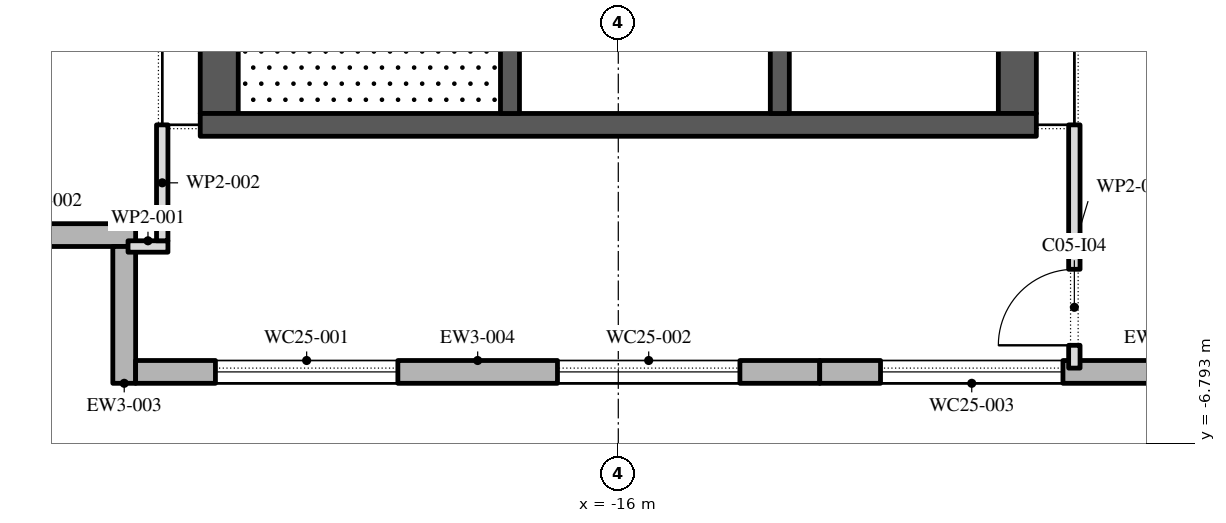
"""IFC4 building model, lengths in metres.
Left out: names, types, materials, properties, quantities, classifications, styles, units other than length and angle.
Written with IfcOpenShell. Run it as: python <this file> out.ifc"""

import sys

from ifc_helpers import new_model, si_unit, direction, frame, frame_2d, origin, place, context, subcontext, project, spatial, polyline, rectangle, outline, extrude, element, fill, save


model = new_model("IFC4")
c1 = context("Model", 3, precision=1e-05, world=origin(), true_north=direction((0.0, 1.0)))
c2 = subcontext(c1, "Body", "Model", "MODEL_VIEW")
j1 = project(units=[si_unit("LENGTHUNIT", "METRE"), si_unit("PLANEANGLEUNIT", "RADIAN")], contexts=[c1])
p1 = place(None, origin())
s1 = spatial("IfcSite", under=j1, at=p1, CompositionType="ELEMENT")
p2 = place(p1, origin())
s2 = spatial("IfcBuilding", under=s1, at=p2, CompositionType="ELEMENT")
p3 = place(p2, frame((0.0, 0.0, 385.8)))
s3 = spatial("IfcBuildingStorey", under=s2, at=p3, CompositionType="ELEMENT", Elevation=385.8)
p4 = place(p3, frame((-24.75, -4.05, 0.0), z_axis=(0.0, 0.0, 1.0), x_axis=(1.0, 0.0, 0.0)))
e1 = element("IfcWall", 1, at=p4, inside=s3, PredefinedType="STANDARD", context=c2, shape_type="SweptSolid", body=[
    extrude(rectangle(XDim=2.4, YDim=0.3, at=frame_2d((1.2, 0.0))), origin(), (0.0, 0.0, 1.0), 4.0),
])
p5 = place(p3, frame((-22.5, -4.2, 0.0), z_axis=(0.0, 0.0, 1.0), x_axis=(0.0, -1.0, 0.0)))
e2 = element("IfcWall", 2, at=p5, inside=s3, PredefinedType="STANDARD", context=c2, shape_type="SweptSolid", body=[
    extrude(rectangle(XDim=1.8, YDim=0.3, at=frame_2d((0.9, 0.0))), origin(), (0.0, 0.0, 1.0), 4.0),
])
p6 = place(p3, frame((-22.35, -5.85, 0.0), z_axis=(0.0, 0.0, 1.0), x_axis=(1.0, 0.0, 0.0)))
e3 = element("IfcWall", 3, at=p6, inside=s3, PredefinedType="STANDARD", context=c2, shape_type="SweptSolid", body=[
    extrude(rectangle(XDim=9.0, YDim=0.3, at=frame_2d((4.5, 0.0))), origin(), (0.0, 0.0, 1.0), 4.0),
])
p7 = place(p6, frame((1.05, 0.0, 0.8)))
e4 = element("IfcOpeningElement", 4, at=p7, cuts=e3, PredefinedType="OPENING", context=c2, shape_type="SweptSolid", body=[
    extrude(outline(polyline([(0.0, 0.0), (2.4, 0.0), (2.4, 1.25), (2.377, 1.488), (2.31, 1.717), (2.2, 1.929), (2.051, 2.116), (1.87, 2.272), (1.663, 2.391), (1.437, 2.468), (1.2, 2.5), (0.963, 2.468), (0.737, 2.391), (0.53, 2.272), (0.349, 2.116), (0.2, 1.929), (0.09, 1.717), (0.023, 1.488), (0.0, 1.25), (0.0, 0.0)])), frame((0.0, 0.16, 0.0), z_axis=(0.0, -1.0, 0.0), x_axis=(1.0, 0.0, 0.0)), (0.0, 0.0, 1.0), 0.32),
])
p8 = place(p6, frame((5.55, 0.0, 0.8)))
e5 = element("IfcOpeningElement", 5, at=p8, cuts=e3, PredefinedType="OPENING", context=c2, shape_type="SweptSolid", body=[
    extrude(outline(polyline([(0.0, 0.0), (2.4, 0.0), (2.4, 1.25), (2.377, 1.488), (2.31, 1.717), (2.2, 1.929), (2.051, 2.116), (1.87, 2.272), (1.663, 2.391), (1.437, 2.468), (1.2, 2.5), (0.963, 2.468), (0.737, 2.391), (0.53, 2.272), (0.349, 2.116), (0.2, 1.929), (0.09, 1.717), (0.023, 1.488), (0.0, 1.25), (0.0, 0.0)])), frame((0.0, 0.16, 0.0), z_axis=(0.0, -1.0, 0.0), x_axis=(1.0, 0.0, 0.0)), (0.0, 0.0, 1.0), 0.32),
])
p9 = place(p3, frame((-13.35, -5.85, 0.0), z_axis=(0.0, 0.0, 1.0), x_axis=(1.0, 0.0, 0.0)))
e6 = element("IfcWall", 6, at=p9, inside=s3, PredefinedType="STANDARD", context=c2, shape_type="SweptSolid", body=[
    extrude(rectangle(XDim=9.0, YDim=0.3, at=frame_2d((4.5, 0.0))), origin(), (0.0, 0.0, 1.0), 4.0),
])
p10 = place(p9, frame((0.8, 0.0, 0.8)))
e7 = element("IfcOpeningElement", 7, at=p10, cuts=e6, PredefinedType="OPENING", context=c2, shape_type="SweptSolid", body=[
    extrude(outline(polyline([(0.0, 0.0), (2.4, 0.0), (2.4, 1.25), (2.377, 1.488), (2.31, 1.717), (2.2, 1.929), (2.051, 2.116), (1.87, 2.272), (1.663, 2.391), (1.437, 2.468), (1.2, 2.5), (0.963, 2.468), (0.737, 2.391), (0.53, 2.272), (0.349, 2.116), (0.2, 1.929), (0.09, 1.717), (0.023, 1.488), (0.0, 1.25), (0.0, 0.0)])), frame((0.0, 0.16, 0.0), z_axis=(0.0, -1.0, 0.0), x_axis=(1.0, 0.0, 0.0)), (0.0, 0.0, 1.0), 0.32),
])
p11 = place(p9, frame((5.55, 0.0, 0.8)))
e8 = element("IfcOpeningElement", 8, at=p11, cuts=e6, PredefinedType="OPENING", context=c2, shape_type="SweptSolid", body=[
    extrude(outline(polyline([(0.0, 0.0), (2.4, 0.0), (2.4, 1.25), (2.377, 1.488), (2.31, 1.717), (2.2, 1.929), (2.051, 2.116), (1.87, 2.272), (1.663, 2.391), (1.437, 2.468), (1.2, 2.5), (0.963, 2.468), (0.737, 2.391), (0.53, 2.272), (0.349, 2.116), (0.2, 1.929), (0.09, 1.717), (0.023, 1.488), (0.0, 1.25), (0.0, 0.0)])), frame((0.0, 0.16, 0.0), z_axis=(0.0, -1.0, 0.0), x_axis=(1.0, 0.0, 0.0)), (0.0, 0.0, 1.0), 0.32),
])
p12 = place(p3, frame((-21.25, -2.45, 0.0), z_axis=(0.0, 0.0, 1.0), x_axis=(0.0, 1.0, 0.0)))
e9 = element("IfcWall", 9, at=p12, inside=s3, PredefinedType="SHEAR", context=c2, shape_type="SweptSolid", body=[
    extrude(rectangle(XDim=27.9, YDim=0.5, at=frame_2d((13.95, 0.0))), origin(), (0.0, 0.0, 1.0), 4.0),
])
p13 = place(p12, frame((5.05, 0.0, 0.0)))
e10 = element("IfcOpeningElement", 10, at=p13, cuts=e9, PredefinedType="OPENING", context=c2, shape_type="SweptSolid", body=[
    extrude(rectangle(XDim=1.2, YDim=2.1, at=frame_2d((0.6, 1.05))), frame((0.0, 0.26, 0.0), z_axis=(0.0, -1.0, 0.0), x_axis=(1.0, 0.0, 0.0)), (0.0, 0.0, 1.0), 0.52),
])
p14 = place(p12, frame((21.65, 0.0, 0.0)))
e11 = element("IfcOpeningElement", 11, at=p14, cuts=e9, PredefinedType="OPENING", context=c2, shape_type="SweptSolid", body=[
    extrude(rectangle(XDim=1.2, YDim=2.1, at=frame_2d((0.6, 1.05))), frame((0.0, 0.26, 0.0), z_axis=(0.0, -1.0, 0.0), x_axis=(1.0, 0.0, 0.0)), (0.0, 0.0, 1.0), 0.52),
])
p15 = place(p3, frame((-10.75, -2.45, 0.0), z_axis=(0.0, 0.0, 1.0), x_axis=(0.0, 1.0, 0.0)))
e12 = element("IfcWall", 12, at=p15, inside=s3, PredefinedType="SHEAR", context=c2, shape_type="SweptSolid", body=[
    extrude(rectangle(XDim=27.9, YDim=0.5, at=frame_2d((13.95, 0.0))), origin(), (0.0, 0.0, 1.0), 4.0),
])
p16 = place(p15, frame((23.65, 0.0, 0.0)))
e13 = element("IfcOpeningElement", 13, at=p16, cuts=e12, PredefinedType="OPENING", context=c2, shape_type="SweptSolid", body=[
    extrude(rectangle(XDim=2.4, YDim=2.1, at=frame_2d((1.2, 1.05))), frame((0.0, 0.26, 0.0), z_axis=(0.0, -1.0, 0.0), x_axis=(1.0, 0.0, 0.0)), (0.0, 0.0, 1.0), 0.52),
])
p17 = place(p15, frame((1.387, 0.0, 0.0)))
e14 = element("IfcOpeningElement", 14, at=p17, cuts=e12, PredefinedType="OPENING", context=c2, shape_type="SweptSolid", body=[
    extrude(rectangle(XDim=0.9, YDim=2.1, at=frame_2d((0.45, 1.05))), frame((0.0, 0.26, 0.0), z_axis=(0.0, -1.0, 0.0), x_axis=(1.0, 0.0, 0.0)), (0.0, 0.0, 1.0), 0.52),
])
p18 = place(p15, frame((4.562, 0.0, 0.0)))
e15 = element("IfcOpeningElement", 15, at=p18, cuts=e12, PredefinedType="OPENING", context=c2, shape_type="SweptSolid", body=[
    extrude(rectangle(XDim=1.0, YDim=2.1, at=frame_2d((0.5, 1.05))), frame((0.0, 0.26, 0.0), z_axis=(0.0, -1.0, 0.0), x_axis=(1.0, 0.0, 0.0)), (0.0, 0.0, 1.0), 0.52),
])
p19 = place(p3, frame((-21.5, -2.6, 0.0), z_axis=(0.0, 0.0, 1.0), x_axis=(1.0, 0.0, 0.0)))
e16 = element("IfcWall", 16, at=p19, inside=s3, PredefinedType="SHEAR", context=c2, shape_type="SweptSolid", body=[
    extrude(rectangle(XDim=11.0, YDim=0.3, at=frame_2d((5.5, 0.0))), origin(), (0.0, 0.0, 1.0), 4.0),
])
p20 = place(p3, frame((-17.425, -2.45, 0.0), z_axis=(0.0, 0.0, 1.0), x_axis=(0.0, 1.0, 0.0)))
e17 = element("IfcWall", 17, at=p20, inside=s3, PredefinedType="SHEAR", context=c2, shape_type="SweptSolid", body=[
    extrude(rectangle(XDim=6.3, YDim=0.25, at=frame_2d((3.15, 0.0))), origin(), (0.0, 0.0, 1.0), 4.0),
])
p21 = place(p20, frame((5.05, 0.0, 0.0)))
e18 = element("IfcOpeningElement", 18, at=p21, cuts=e17, PredefinedType="OPENING", context=c2, shape_type="SweptSolid", body=[
    extrude(rectangle(XDim=1.2, YDim=2.1, at=frame_2d((0.6, 1.05))), frame((0.0, 0.135, 0.0), z_axis=(0.0, -1.0, 0.0), x_axis=(1.0, 0.0, 0.0)), (0.0, 0.0, 1.0), 0.27),
])
p22 = place(p3, frame((-13.875, -2.45, 0.0), z_axis=(0.0, 0.0, 1.0), x_axis=(0.0, 1.0, 0.0)))
e19 = element("IfcWall", 19, at=p22, inside=s3, PredefinedType="SHEAR", context=c2, shape_type="SweptSolid", body=[
    extrude(rectangle(XDim=21.3, YDim=0.25, at=frame_2d((10.65, 0.0))), origin(), (0.0, 0.0, 1.0), 4.0),
])
p23 = place(p22, frame((11.446, 0.0, 0.0)))
e20 = element("IfcOpeningElement", 20, at=p23, cuts=e19, PredefinedType="OPENING", context=c2, shape_type="SweptSolid", body=[
    extrude(rectangle(XDim=0.9, YDim=2.1, at=frame_2d((0.45, 1.05))), frame((0.0, 0.135, 0.0), z_axis=(0.0, -1.0, 0.0), x_axis=(1.0, 0.0, 0.0)), (0.0, 0.0, 1.0), 0.27),
])
p24 = place(p22, frame((17.725, 0.0, 0.0)))
e21 = element("IfcOpeningElement", 21, at=p24, cuts=e19, PredefinedType="OPENING", context=c2, shape_type="SweptSolid", body=[
    extrude(rectangle(XDim=0.9, YDim=2.1, at=frame_2d((0.45, 1.05))), frame((0.0, 0.135, 0.0), z_axis=(0.0, -1.0, 0.0), x_axis=(1.0, 0.0, 0.0)), (0.0, 0.0, 1.0), 0.27),
])
p25 = place(p22, frame((6.971, 0.0, 0.0)))
e22 = element("IfcOpeningElement", 22, at=p25, cuts=e19, PredefinedType="OPENING", context=c2, shape_type="SweptSolid", body=[
    extrude(rectangle(XDim=1.1, YDim=2.1, at=frame_2d((0.55, 1.05))), frame((0.0, 0.135, 0.0), z_axis=(0.0, -1.0, 0.0), x_axis=(1.0, 0.0, 0.0)), (0.0, 0.0, 1.0), 0.27),
])
p26 = place(p3, frame((-21.925, -4.2, 0.0), z_axis=(0.0, 0.0, 1.0), x_axis=(-1.0, 0.0, 0.0)))
e23 = element("IfcWall", 23, at=p26, inside=s3, PredefinedType="PARTITIONING", context=c2, shape_type="SweptSolid", body=[
    extrude(rectangle(XDim=0.525, YDim=0.15, at=frame_2d((0.262, 0.0))), origin(), (0.0, 0.0, 1.0), 4.0),
])
p27 = place(p3, frame((-22.0, -2.6, 0.0), z_axis=(0.0, 0.0, 1.0), x_axis=(0.0, -1.0, 0.0)))
e24 = element("IfcWall", 24, at=p27, inside=s3, PredefinedType="PARTITIONING", context=c2, shape_type="SweptSolid", body=[
    extrude(rectangle(XDim=1.525, YDim=0.15, at=frame_2d((0.762, 0.0))), origin(), (0.0, 0.0, 1.0), 4.0),
])
p28 = place(p3, frame((-10.0, -5.8, 0.0), z_axis=(0.0, 0.0, 1.0), x_axis=(0.0, 1.0, 0.0)))
e25 = element("IfcWall", 25, at=p28, inside=s3, PredefinedType="PARTITIONING", context=c2, shape_type="SweptSolid", body=[
    extrude(rectangle(XDim=3.2, YDim=0.15, at=frame_2d((1.6, 0.0))), origin(), (0.0, 0.0, 1.0), 4.0),
])
p29 = place(p28, frame((0.3, 0.0, 0.0)))
e26 = element("IfcOpeningElement", 26, at=p29, cuts=e25, PredefinedType="OPENING", context=c2, shape_type="SweptSolid", body=[
    extrude(rectangle(XDim=1.0, YDim=2.1, at=frame_2d((0.5, 1.05))), frame((0.0, 0.085, 0.0), z_axis=(0.0, -1.0, 0.0), x_axis=(1.0, 0.0, 0.0)), (0.0, 0.0, 1.0), 0.17),
])
p30 = place(p7, origin())
e27 = element("IfcWindow", 27, at=p30, inside=s3, PartitioningType="DOUBLE_PANEL_VERTICAL", PredefinedType="WINDOW", context=c2, shape_type="SweptSolid", body=[
    extrude(outline(polyline([(0.0, 0.0), (2.4, 0.0), (2.4, 1.25), (2.377, 1.488), (2.31, 1.717), (2.2, 1.929), (2.051, 2.116), (1.87, 2.272), (1.663, 2.391), (1.437, 2.468), (1.2, 2.5), (0.963, 2.468), (0.737, 2.391), (0.53, 2.272), (0.349, 2.116), (0.2, 1.929), (0.09, 1.717), (0.023, 1.488), (0.0, 1.25), (0.0, 0.0)])), frame((0.0, 0.03, 0.0), z_axis=(0.0, -1.0, 0.0), x_axis=(1.0, 0.0, 0.0)), (0.0, 0.0, 1.0), 0.06),
])
fill(e4, e27)
p31 = place(p8, origin())
e28 = element("IfcWindow", 28, at=p31, inside=s3, PartitioningType="DOUBLE_PANEL_VERTICAL", PredefinedType="WINDOW", context=c2, shape_type="SweptSolid", body=[
    extrude(outline(polyline([(0.0, 0.0), (2.4, 0.0), (2.4, 1.25), (2.377, 1.488), (2.31, 1.717), (2.2, 1.929), (2.051, 2.116), (1.87, 2.272), (1.663, 2.391), (1.437, 2.468), (1.2, 2.5), (0.963, 2.468), (0.737, 2.391), (0.53, 2.272), (0.349, 2.116), (0.2, 1.929), (0.09, 1.717), (0.023, 1.488), (0.0, 1.25), (0.0, 0.0)])), frame((0.0, 0.03, 0.0), z_axis=(0.0, -1.0, 0.0), x_axis=(1.0, 0.0, 0.0)), (0.0, 0.0, 1.0), 0.06),
])
fill(e5, e28)
p32 = place(p10, origin())
e29 = element("IfcWindow", 29, at=p32, inside=s3, PartitioningType="DOUBLE_PANEL_VERTICAL", PredefinedType="WINDOW", context=c2, shape_type="SweptSolid", body=[
    extrude(outline(polyline([(0.0, 0.0), (2.4, 0.0), (2.4, 1.25), (2.377, 1.488), (2.31, 1.717), (2.2, 1.929), (2.051, 2.116), (1.87, 2.272), (1.663, 2.391), (1.437, 2.468), (1.2, 2.5), (0.963, 2.468), (0.737, 2.391), (0.53, 2.272), (0.349, 2.116), (0.2, 1.929), (0.09, 1.717), (0.023, 1.488), (0.0, 1.25), (0.0, 0.0)])), frame((0.0, 0.03, 0.0), z_axis=(0.0, -1.0, 0.0), x_axis=(1.0, 0.0, 0.0)), (0.0, 0.0, 1.0), 0.06),
])
fill(e7, e29)
p33 = place(p29, origin())
e30 = element("IfcDoor", 30, at=p33, inside=s3, OperationType="SINGLE_SWING_RIGHT", PredefinedType="DOOR", context=c2, shape_type="SweptSolid", body=[
    extrude(rectangle(XDim=1.0, YDim=2.1, at=frame_2d((0.5, 1.05))), frame((0.0, 0.025, 0.0), z_axis=(0.0, -1.0, 0.0), x_axis=(1.0, 0.0, 0.0)), (0.0, 0.0, 1.0), 0.05),
])
fill(e26, e30)
save(model, sys.argv[1])
